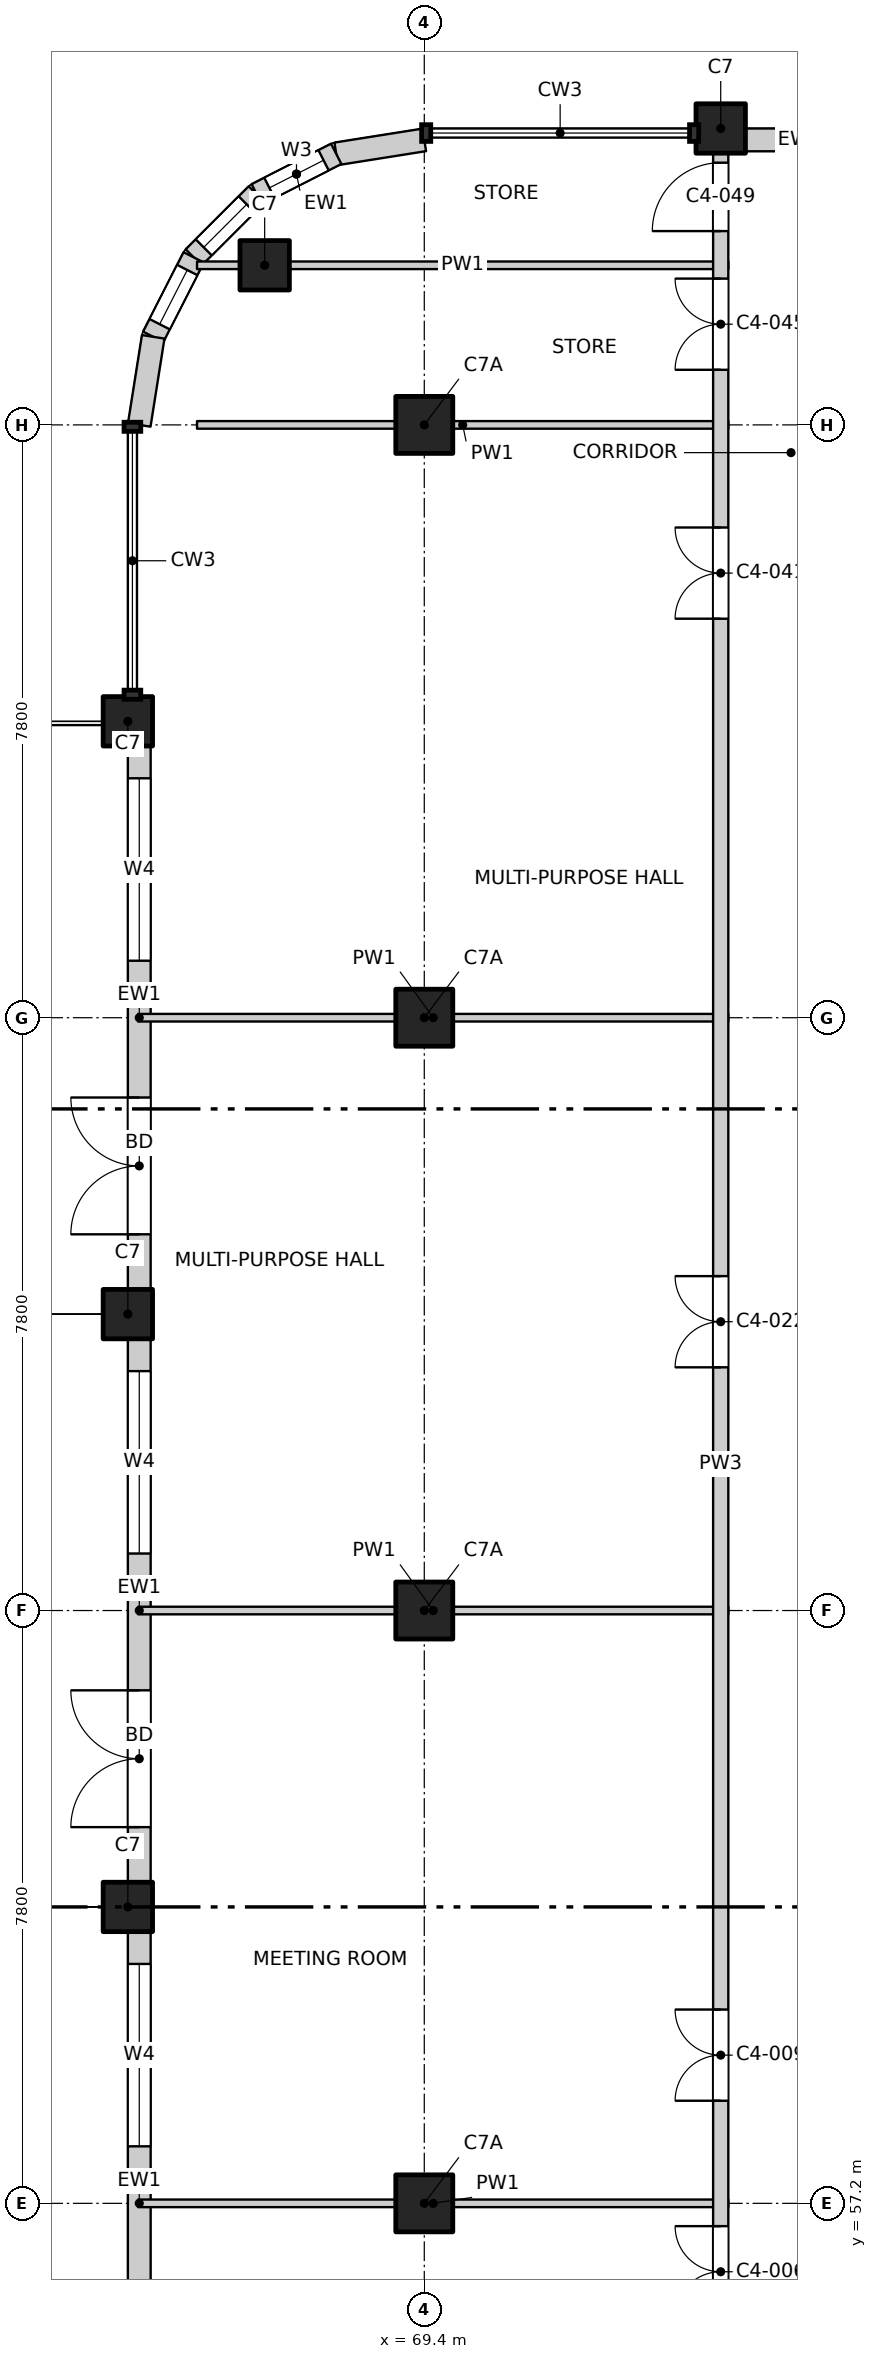
"""IFC4 building model, lengths in metres.
Left out: names, types, materials, properties, quantities, classifications, styles, units other than length and angle.
Written with IfcOpenShell. Run it as: python <this file> out.ifc"""

import sys

from ifc_helpers import new_model, si_unit, direction, frame, frame_2d, origin, origin_2d, place, context, subcontext, project, spatial, rectangle, extrude, element, fill, save


model = new_model("IFC4")
c1 = context("Model", 3, precision=1e-05, world=origin(), true_north=direction((0.0, 1.0)))
c2 = subcontext(c1, "Body", "Model", "MODEL_VIEW")
j1 = project(units=[si_unit("LENGTHUNIT", "METRE"), si_unit("PLANEANGLEUNIT", "RADIAN")], contexts=[c1])
p1 = place(None, origin())
s1 = spatial("IfcSite", under=j1, at=p1, CompositionType="ELEMENT")
p2 = place(p1, origin())
s2 = spatial("IfcBuilding", under=s1, at=p2, CompositionType="ELEMENT")
p3 = place(p2, frame((0.0, 0.0, 256.2)))
s3 = spatial("IfcBuildingStorey", under=s2, at=p3, CompositionType="ELEMENT", Elevation=256.2)
for number, where, z_axis, x_axis in (
    (1, (67.3, 82.7, -0.25), (0.0, 0.0, 1.0), (1.0, 0.0, 0.0)),
    (2, (73.3, 84.5, -0.25), (0.0, 0.0, 1.0), (1.0, 0.0, 0.0)),
    (3, (65.5, 61.1, -0.25), (0.0, 0.0, 1.0), (1.0, 0.0, 0.0)),
    (4, (65.5, 68.9, -0.25), (0.0, 0.0, 1.0), (1.0, 0.0, 0.0)),
    (5, (65.5, 76.7, -0.25), (0.0, 0.0, 1.0), (1.0, 0.0, 0.0)),
):
    element("IfcColumn", number, at=place(p3, frame(where, z_axis=z_axis, x_axis=x_axis)), inside=s3, PredefinedType="COLUMN", context=c2, shape_type="SweptSolid", body=[
        extrude(rectangle(XDim=0.65, YDim=0.65, at=origin_2d()), origin(), (0.0, 0.0, 1.0), 3.4),
    ])
for number, where, z_axis, x_axis in (
    (6, (69.4, 57.2, -0.25), (0.0, 0.0, 1.0), (1.0, 0.0, 0.0)),
    (7, (69.4, 65.0, -0.25), (0.0, 0.0, 1.0), (1.0, 0.0, 0.0)),
    (8, (69.4, 72.8, -0.25), (0.0, 0.0, 1.0), (1.0, 0.0, 0.0)),
    (9, (69.4, 80.6, -0.25), (0.0, 0.0, 1.0), (1.0, 0.0, 0.0)),
):
    element("IfcColumn", number, at=place(p3, frame(where, z_axis=z_axis, x_axis=x_axis)), inside=s3, PredefinedType="COLUMN", context=c2, shape_type="SweptSolid", body=[
        extrude(rectangle(XDim=0.75, YDim=0.75, at=origin_2d()), origin(), (0.0, 0.0, 1.0), 3.4),
    ])
p4 = place(p3, frame((73.625, 84.35, 0.0), z_axis=(0.0, 0.0, 1.0), x_axis=(1.0, 0.0, 0.0)))
e10 = element("IfcWall", 10, at=p4, inside=s3, PredefinedType="SOLIDWALL", context=c2, shape_type="SweptSolid", body=[
    extrude(rectangle(XDim=1.425, YDim=0.3, at=frame_2d((0.712, 0.0))), origin(), (0.0, 0.0, 1.0), 2.7),
])
p5 = place(p3, frame((65.65, 53.625, 0.0), z_axis=(0.0, 0.0, 1.0), x_axis=(0.0, 1.0, 0.0)))
e11 = element("IfcWall", 11, at=p5, inside=s3, PredefinedType="SOLIDWALL", context=c2, shape_type="SweptSolid", body=[
    extrude(rectangle(XDim=7.15, YDim=0.3, at=frame_2d((3.575, 0.0))), origin(), (0.0, 0.0, 1.0), 2.7),
])
p6 = place(p5, frame((0.725, 0.0, 0.0)))
e12 = element("IfcOpeningElement", 12, at=p6, cuts=e11, PredefinedType="OPENING", context=c2, shape_type="SweptSolid", body=[
    extrude(rectangle(XDim=1.8, YDim=2.4, at=frame_2d((0.9, 1.2))), frame((0.0, 0.16, 0.0), z_axis=(0.0, -1.0, 0.0), x_axis=(1.0, 0.0, 0.0)), (0.0, 0.0, 1.0), 0.32),
])
p7 = place(p5, frame((4.325, 0.0, 0.6)))
e13 = element("IfcOpeningElement", 13, at=p7, cuts=e11, PredefinedType="OPENING", context=c2, shape_type="SweptSolid", body=[
    extrude(rectangle(XDim=2.4, YDim=2.1, at=frame_2d((1.2, 1.05))), frame((0.0, 0.16, 0.0), z_axis=(0.0, -1.0, 0.0), x_axis=(1.0, 0.0, 0.0)), (0.0, 0.0, 1.0), 0.32),
])
p8 = place(p3, frame((65.65, 61.425, 0.0), z_axis=(0.0, 0.0, 1.0), x_axis=(0.0, 1.0, 0.0)))
e14 = element("IfcWall", 14, at=p8, inside=s3, PredefinedType="SOLIDWALL", context=c2, shape_type="SweptSolid", body=[
    extrude(rectangle(XDim=7.15, YDim=0.3, at=frame_2d((3.575, 0.0))), origin(), (0.0, 0.0, 1.0), 2.7),
])
p9 = place(p8, frame((0.725, 0.0, 0.0)))
e15 = element("IfcOpeningElement", 15, at=p9, cuts=e14, PredefinedType="OPENING", context=c2, shape_type="SweptSolid", body=[
    extrude(rectangle(XDim=1.8, YDim=2.4, at=frame_2d((0.9, 1.2))), frame((0.0, 0.16, 0.0), z_axis=(0.0, -1.0, 0.0), x_axis=(1.0, 0.0, 0.0)), (0.0, 0.0, 1.0), 0.32),
])
p10 = place(p8, frame((4.325, 0.0, 0.6)))
e16 = element("IfcOpeningElement", 16, at=p10, cuts=e14, PredefinedType="OPENING", context=c2, shape_type="SweptSolid", body=[
    extrude(rectangle(XDim=2.4, YDim=2.1, at=frame_2d((1.2, 1.05))), frame((0.0, 0.16, 0.0), z_axis=(0.0, -1.0, 0.0), x_axis=(1.0, 0.0, 0.0)), (0.0, 0.0, 1.0), 0.32),
])
p11 = place(p3, frame((65.65, 69.225, 0.0), z_axis=(0.0, 0.0, 1.0), x_axis=(0.0, 1.0, 0.0)))
e17 = element("IfcWall", 17, at=p11, inside=s3, PredefinedType="SOLIDWALL", context=c2, shape_type="SweptSolid", body=[
    extrude(rectangle(XDim=7.15, YDim=0.3, at=frame_2d((3.575, 0.0))), origin(), (0.0, 0.0, 1.0), 2.7),
])
p12 = place(p11, frame((0.725, 0.0, 0.0)))
e18 = element("IfcOpeningElement", 18, at=p12, cuts=e17, PredefinedType="OPENING", context=c2, shape_type="SweptSolid", body=[
    extrude(rectangle(XDim=1.8, YDim=2.4, at=frame_2d((0.9, 1.2))), frame((0.0, 0.16, 0.0), z_axis=(0.0, -1.0, 0.0), x_axis=(1.0, 0.0, 0.0)), (0.0, 0.0, 1.0), 0.32),
])
p13 = place(p11, frame((4.325, 0.0, 0.6)))
e19 = element("IfcOpeningElement", 19, at=p13, cuts=e17, PredefinedType="OPENING", context=c2, shape_type="SweptSolid", body=[
    extrude(rectangle(XDim=2.4, YDim=2.1, at=frame_2d((1.2, 1.05))), frame((0.0, 0.16, 0.0), z_axis=(0.0, -1.0, 0.0), x_axis=(1.0, 0.0, 0.0)), (0.0, 0.0, 1.0), 0.32),
])
p14 = place(p3, frame((69.4, 84.35, 0.0), z_axis=(0.0, 0.0, 1.0), x_axis=(-0.987678452879, -0.156496880861, 0.0)))
e20 = element("IfcWall", 20, at=p14, inside=s3, PredefinedType="SOLIDWALL", context=c2, shape_type="SweptSolid", body=[
    extrude(rectangle(XDim=1.173, YDim=0.3, at=frame_2d((0.586, 0.0))), origin(), (0.0, 0.0, 1.0), 2.7),
])
p15 = place(p3, frame((68.241, 84.167, 0.0), z_axis=(0.0, 0.0, 1.0), x_axis=(-0.890988677504, -0.454025524128, 0.0)))
e21 = element("IfcWall", 21, at=p15, inside=s3, PredefinedType="SOLIDWALL", context=c2, shape_type="SweptSolid", body=[
    extrude(rectangle(XDim=1.173, YDim=0.3, at=frame_2d((0.587, 0.0))), origin(), (0.0, 0.0, 1.0), 2.7),
])
p16 = place(p15, frame((0.187, 0.0, 0.9)))
e22 = element("IfcOpeningElement", 22, at=p16, cuts=e21, PredefinedType="OPENING", context=c2, shape_type="SweptSolid", body=[
    extrude(rectangle(XDim=0.8, YDim=1.2, at=frame_2d((0.4, 0.6))), frame((0.0, 0.16, 0.0), z_axis=(0.0, -1.0, 0.0), x_axis=(1.0, 0.0, 0.0)), (0.0, 0.0, 1.0), 0.32),
])
p17 = place(p3, frame((67.196, 83.634, 0.0), z_axis=(0.0, 0.0, 1.0), x_axis=(-0.707106781187, -0.707106781187, 0.0)))
e23 = element("IfcWall", 23, at=p17, inside=s3, PredefinedType="SOLIDWALL", context=c2, shape_type="SweptSolid", body=[
    extrude(rectangle(XDim=1.173, YDim=0.3, at=frame_2d((0.586, 0.0))), origin(), (0.0, 0.0, 1.0), 2.7),
])
p18 = place(p17, frame((0.187, 0.0, 0.9)))
e24 = element("IfcOpeningElement", 24, at=p18, cuts=e23, PredefinedType="OPENING", context=c2, shape_type="SweptSolid", body=[
    extrude(rectangle(XDim=0.8, YDim=1.2, at=frame_2d((0.4, 0.6))), frame((0.0, 0.16, 0.0), z_axis=(0.0, -1.0, 0.0), x_axis=(1.0, 0.0, 0.0)), (0.0, 0.0, 1.0), 0.32),
])
p19 = place(p3, frame((66.366, 82.804, 0.0), z_axis=(0.0, 0.0, 1.0), x_axis=(-0.454025524128, -0.890988677504, 0.0)))
e25 = element("IfcWall", 25, at=p19, inside=s3, PredefinedType="SOLIDWALL", context=c2, shape_type="SweptSolid", body=[
    extrude(rectangle(XDim=1.173, YDim=0.3, at=frame_2d((0.587, 0.0))), origin(), (0.0, 0.0, 1.0), 2.7),
])
p20 = place(p19, frame((0.187, 0.0, 0.9)))
e26 = element("IfcOpeningElement", 26, at=p20, cuts=e25, PredefinedType="OPENING", context=c2, shape_type="SweptSolid", body=[
    extrude(rectangle(XDim=0.8, YDim=1.2, at=frame_2d((0.4, 0.6))), frame((0.0, 0.16, 0.0), z_axis=(0.0, -1.0, 0.0), x_axis=(1.0, 0.0, 0.0)), (0.0, 0.0, 1.0), 0.32),
])
p21 = place(p3, frame((65.833, 81.759, 0.0), z_axis=(0.0, 0.0, 1.0), x_axis=(-0.156496880861, -0.987678452879, 0.0)))
e27 = element("IfcWall", 27, at=p21, inside=s3, PredefinedType="SOLIDWALL", context=c2, shape_type="SweptSolid", body=[
    extrude(rectangle(XDim=1.173, YDim=0.3, at=frame_2d((0.586, 0.0))), origin(), (0.0, 0.0, 1.0), 2.7),
])
for number, where, z_axis, x_axis in (
    (28, (65.635, 57.2, 0.0), (0.0, 0.0, 1.0), (1.0, 0.0, 0.0)),
    (29, (65.635, 65.0, 0.0), (0.0, 0.0, 1.0), (1.0, 0.0, 0.0)),
    (30, (65.635, 72.8, 0.0), (0.0, 0.0, 1.0), (1.0, 0.0, 0.0)),
):
    element("IfcWall", number, at=place(p3, frame(where, z_axis=z_axis, x_axis=x_axis)), inside=s3, PredefinedType="PARTITIONING", context=c2, shape_type="SweptSolid", body=[
        extrude(rectangle(XDim=7.765, YDim=0.1, at=frame_2d((3.883, 0.0))), origin(), (0.0, 0.0, 1.0), 3.15),
    ])
for number, where, z_axis, x_axis in (
    (31, (66.41, 80.6, 0.0), (0.0, 0.0, 1.0), (1.0, 0.0, 0.0)),
    (32, (66.41, 82.7, 0.0), (0.0, 0.0, 1.0), (1.0, 0.0, 0.0)),
):
    element("IfcWall", number, at=place(p3, frame(where, z_axis=z_axis, x_axis=x_axis)), inside=s3, PredefinedType="PARTITIONING", context=c2, shape_type="SweptSolid", body=[
        extrude(rectangle(XDim=6.99, YDim=0.1, at=frame_2d((3.495, 0.0))), origin(), (0.0, 0.0, 1.0), 3.15),
    ])
p22 = place(p3, frame((73.3, 49.5, 0.0), z_axis=(0.0, 0.0, 1.0), x_axis=(0.0, 1.0, 0.0)))
e33 = element("IfcWall", 33, at=p22, inside=s3, PredefinedType="PARTITIONING", context=c2, shape_type="SweptSolid", body=[
    extrude(rectangle(XDim=34.865, YDim=0.2, at=frame_2d((17.433, 0.0))), origin(), (0.0, 0.0, 1.0), 3.15),
])
p23 = place(p22, frame((6.2, 0.0, 0.0)))
e34 = element("IfcOpeningElement", 34, at=p23, cuts=e33, PredefinedType="OPENING", context=c2, shape_type="SweptSolid", body=[
    extrude(rectangle(XDim=1.2, YDim=2.1, at=frame_2d((0.6, 1.05))), frame((0.0, 0.11, 0.0), z_axis=(0.0, -1.0, 0.0), x_axis=(1.0, 0.0, 0.0)), (0.0, 0.0, 1.0), 0.22),
])
p24 = place(p22, frame((9.05, 0.0, 0.0)))
e35 = element("IfcOpeningElement", 35, at=p24, cuts=e33, PredefinedType="OPENING", context=c2, shape_type="SweptSolid", body=[
    extrude(rectangle(XDim=1.2, YDim=2.1, at=frame_2d((0.6, 1.05))), frame((0.0, 0.11, 0.0), z_axis=(0.0, -1.0, 0.0), x_axis=(1.0, 0.0, 0.0)), (0.0, 0.0, 1.0), 0.22),
])
p25 = place(p22, frame((18.7, 0.0, 0.0)))
e36 = element("IfcOpeningElement", 36, at=p25, cuts=e33, PredefinedType="OPENING", context=c2, shape_type="SweptSolid", body=[
    extrude(rectangle(XDim=1.2, YDim=2.1, at=frame_2d((0.6, 1.05))), frame((0.0, 0.11, 0.0), z_axis=(0.0, -1.0, 0.0), x_axis=(1.0, 0.0, 0.0)), (0.0, 0.0, 1.0), 0.22),
])
p26 = place(p22, frame((28.55, 0.0, 0.0)))
e37 = element("IfcOpeningElement", 37, at=p26, cuts=e33, PredefinedType="OPENING", context=c2, shape_type="SweptSolid", body=[
    extrude(rectangle(XDim=1.2, YDim=2.1, at=frame_2d((0.6, 1.05))), frame((0.0, 0.11, 0.0), z_axis=(0.0, -1.0, 0.0), x_axis=(1.0, 0.0, 0.0)), (0.0, 0.0, 1.0), 0.22),
])
p27 = place(p22, frame((31.825, 0.0, 0.0)))
e38 = element("IfcOpeningElement", 38, at=p27, cuts=e33, PredefinedType="OPENING", context=c2, shape_type="SweptSolid", body=[
    extrude(rectangle(XDim=1.2, YDim=2.1, at=frame_2d((0.6, 1.05))), frame((0.0, 0.11, 0.0), z_axis=(0.0, -1.0, 0.0), x_axis=(1.0, 0.0, 0.0)), (0.0, 0.0, 1.0), 0.22),
])
p28 = place(p22, frame((33.65, 0.0, 0.0)))
e39 = element("IfcOpeningElement", 39, at=p28, cuts=e33, PredefinedType="OPENING", context=c2, shape_type="SweptSolid", body=[
    extrude(rectangle(XDim=0.9, YDim=2.1, at=frame_2d((0.45, 1.05))), frame((0.0, 0.11, 0.0), z_axis=(0.0, -1.0, 0.0), x_axis=(1.0, 0.0, 0.0)), (0.0, 0.0, 1.0), 0.22),
])
p29 = place(p7, origin())
e40 = element("IfcWindow", 40, at=p29, inside=s3, PartitioningType="SINGLE_PANEL", PredefinedType="WINDOW", context=c2, shape_type="SweptSolid", body=[
    extrude(rectangle(XDim=2.4, YDim=2.1, at=frame_2d((1.2, 1.05))), frame((0.0, 0.03, 0.0), z_axis=(0.0, -1.0, 0.0), x_axis=(1.0, 0.0, 0.0)), (0.0, 0.0, 1.0), 0.06),
])
fill(e13, e40)
p30 = place(p9, origin())
e41 = element("IfcDoor", 41, at=p30, inside=s3, OperationType="DOUBLE_DOOR_SINGLE_SWING", PredefinedType="DOOR", context=c2, shape_type="SweptSolid", body=[
    extrude(rectangle(XDim=1.8, YDim=2.4, at=frame_2d((0.9, 1.2))), frame((0.0, 0.025, 0.0), z_axis=(0.0, -1.0, 0.0), x_axis=(1.0, 0.0, 0.0)), (0.0, 0.0, 1.0), 0.05),
])
fill(e15, e41)
p31 = place(p10, origin())
e42 = element("IfcWindow", 42, at=p31, inside=s3, PartitioningType="SINGLE_PANEL", PredefinedType="WINDOW", context=c2, shape_type="SweptSolid", body=[
    extrude(rectangle(XDim=2.4, YDim=2.1, at=frame_2d((1.2, 1.05))), frame((0.0, 0.03, 0.0), z_axis=(0.0, -1.0, 0.0), x_axis=(1.0, 0.0, 0.0)), (0.0, 0.0, 1.0), 0.06),
])
fill(e16, e42)
p32 = place(p12, origin())
e43 = element("IfcDoor", 43, at=p32, inside=s3, OperationType="DOUBLE_DOOR_SINGLE_SWING", PredefinedType="DOOR", context=c2, shape_type="SweptSolid", body=[
    extrude(rectangle(XDim=1.8, YDim=2.4, at=frame_2d((0.9, 1.2))), frame((0.0, 0.025, 0.0), z_axis=(0.0, -1.0, 0.0), x_axis=(1.0, 0.0, 0.0)), (0.0, 0.0, 1.0), 0.05),
])
fill(e18, e43)
p33 = place(p13, origin())
e44 = element("IfcWindow", 44, at=p33, inside=s3, PartitioningType="SINGLE_PANEL", PredefinedType="WINDOW", context=c2, shape_type="SweptSolid", body=[
    extrude(rectangle(XDim=2.4, YDim=2.1, at=frame_2d((1.2, 1.05))), frame((0.0, 0.03, 0.0), z_axis=(0.0, -1.0, 0.0), x_axis=(1.0, 0.0, 0.0)), (0.0, 0.0, 1.0), 0.06),
])
fill(e19, e44)
p34 = place(p16, origin())
e45 = element("IfcWindow", 45, at=p34, inside=s3, PartitioningType="SINGLE_PANEL", PredefinedType="WINDOW", context=c2, shape_type="SweptSolid", body=[
    extrude(rectangle(XDim=0.8, YDim=1.2, at=frame_2d((0.4, 0.6))), frame((0.0, 0.03, 0.0), z_axis=(0.0, -1.0, 0.0), x_axis=(1.0, 0.0, 0.0)), (0.0, 0.0, 1.0), 0.06),
])
fill(e22, e45)
p35 = place(p18, origin())
e46 = element("IfcWindow", 46, at=p35, inside=s3, PartitioningType="SINGLE_PANEL", PredefinedType="WINDOW", context=c2, shape_type="SweptSolid", body=[
    extrude(rectangle(XDim=0.8, YDim=1.2, at=frame_2d((0.4, 0.6))), frame((0.0, 0.03, 0.0), z_axis=(0.0, -1.0, 0.0), x_axis=(1.0, 0.0, 0.0)), (0.0, 0.0, 1.0), 0.06),
])
fill(e24, e46)
p36 = place(p20, origin())
e47 = element("IfcWindow", 47, at=p36, inside=s3, PartitioningType="SINGLE_PANEL", PredefinedType="WINDOW", context=c2, shape_type="SweptSolid", body=[
    extrude(rectangle(XDim=0.8, YDim=1.2, at=frame_2d((0.4, 0.6))), frame((0.0, 0.03, 0.0), z_axis=(0.0, -1.0, 0.0), x_axis=(1.0, 0.0, 0.0)), (0.0, 0.0, 1.0), 0.06),
])
fill(e26, e47)
p37 = place(p23, origin())
e48 = element("IfcDoor", 48, at=p37, inside=s3, OperationType="DOUBLE_DOOR_SINGLE_SWING", PredefinedType="DOOR", context=c2, shape_type="SweptSolid", body=[
    extrude(rectangle(XDim=1.2, YDim=2.1, at=frame_2d((0.6, 1.05))), frame((0.0, 0.025, 0.0), z_axis=(0.0, -1.0, 0.0), x_axis=(1.0, 0.0, 0.0)), (0.0, 0.0, 1.0), 0.05),
])
fill(e34, e48)
p38 = place(p24, origin())
e49 = element("IfcDoor", 49, at=p38, inside=s3, OperationType="DOUBLE_DOOR_SINGLE_SWING", PredefinedType="DOOR", context=c2, shape_type="SweptSolid", body=[
    extrude(rectangle(XDim=1.2, YDim=2.1, at=frame_2d((0.6, 1.05))), frame((0.0, 0.025, 0.0), z_axis=(0.0, -1.0, 0.0), x_axis=(1.0, 0.0, 0.0)), (0.0, 0.0, 1.0), 0.05),
])
fill(e35, e49)
p39 = place(p25, origin())
e50 = element("IfcDoor", 50, at=p39, inside=s3, OperationType="DOUBLE_DOOR_SINGLE_SWING", PredefinedType="DOOR", context=c2, shape_type="SweptSolid", body=[
    extrude(rectangle(XDim=1.2, YDim=2.1, at=frame_2d((0.6, 1.05))), frame((0.0, 0.025, 0.0), z_axis=(0.0, -1.0, 0.0), x_axis=(1.0, 0.0, 0.0)), (0.0, 0.0, 1.0), 0.05),
])
fill(e36, e50)
p40 = place(p26, origin())
e51 = element("IfcDoor", 51, at=p40, inside=s3, OperationType="DOUBLE_DOOR_SINGLE_SWING", PredefinedType="DOOR", context=c2, shape_type="SweptSolid", body=[
    extrude(rectangle(XDim=1.2, YDim=2.1, at=frame_2d((0.6, 1.05))), frame((0.0, 0.025, 0.0), z_axis=(0.0, -1.0, 0.0), x_axis=(1.0, 0.0, 0.0)), (0.0, 0.0, 1.0), 0.05),
])
fill(e37, e51)
p41 = place(p27, origin())
e52 = element("IfcDoor", 52, at=p41, inside=s3, OperationType="DOUBLE_DOOR_SINGLE_SWING", PredefinedType="DOOR", context=c2, shape_type="SweptSolid", body=[
    extrude(rectangle(XDim=1.2, YDim=2.1, at=frame_2d((0.6, 1.05))), frame((0.0, 0.025, 0.0), z_axis=(0.0, -1.0, 0.0), x_axis=(1.0, 0.0, 0.0)), (0.0, 0.0, 1.0), 0.05),
])
fill(e38, e52)
p42 = place(p28, origin())
e53 = element("IfcDoor", 53, at=p42, inside=s3, OperationType="SINGLE_SWING_LEFT", PredefinedType="DOOR", context=c2, shape_type="SweptSolid", body=[
    extrude(rectangle(XDim=0.9, YDim=2.1, at=frame_2d((0.45, 1.05))), frame((0.0, 0.025, 0.0), z_axis=(0.0, -1.0, 0.0), x_axis=(1.0, 0.0, 0.0)), (0.0, 0.0, 1.0), 0.05),
])
fill(e39, e53)
save(model, sys.argv[1])
